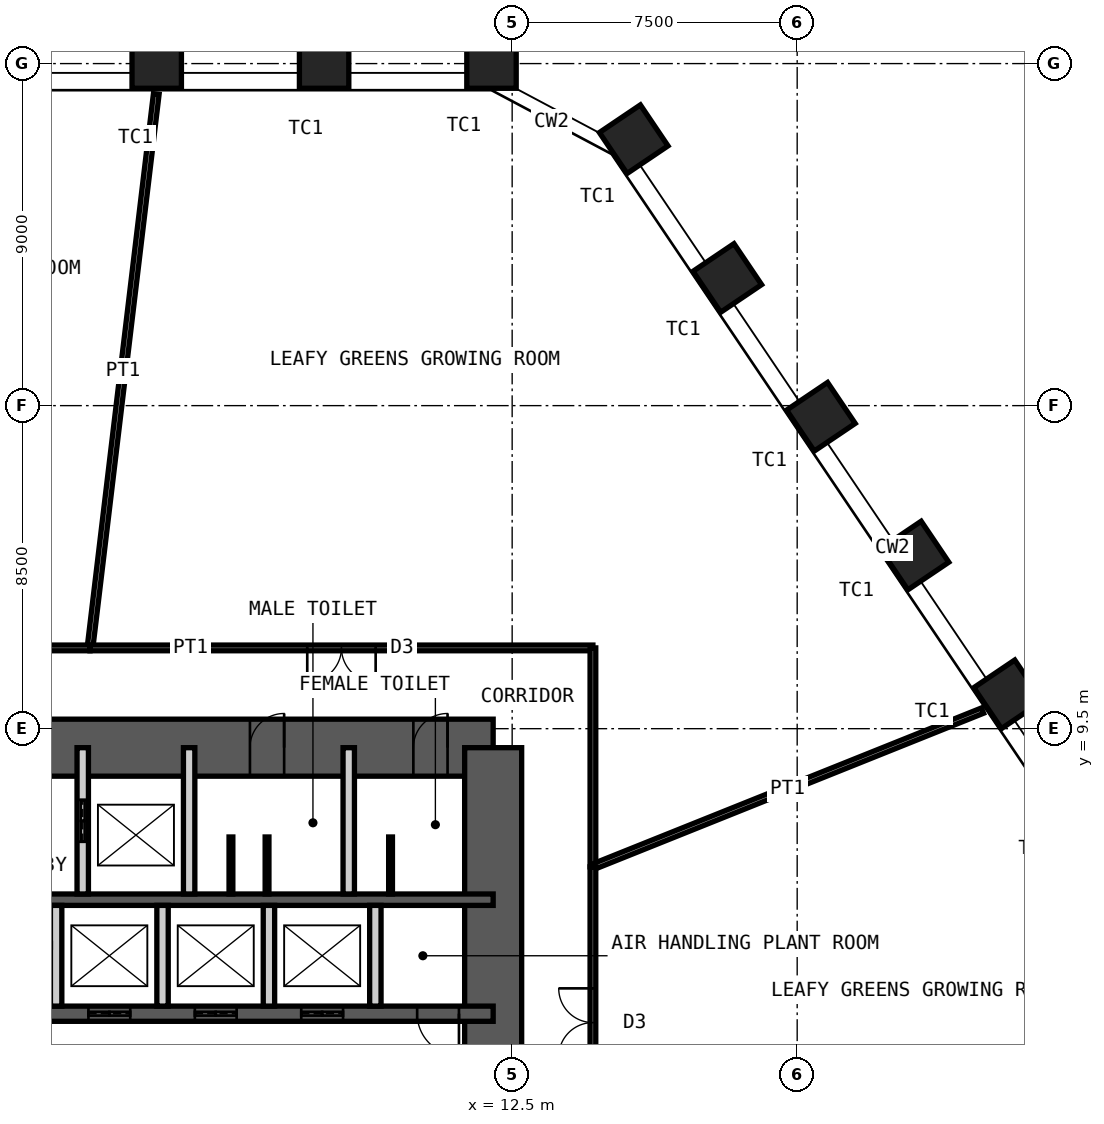
"""IFC4 building model, lengths in metres.
Left out: names, types, materials, properties, quantities, classifications, styles, units other than length and angle.
Written with IfcOpenShell. Run it as: python <this file> out.ifc"""

import sys

from ifc_helpers import new_model, si_unit, direction, frame, frame_2d, origin, origin_2d, place, context, subcontext, project, spatial, rectangle, hollow_rectangle, extrude, element, fill, save


model = new_model("IFC4")
c1 = context("Model", 3, precision=1e-05, world=origin(), true_north=direction((0.0, 1.0)))
c2 = subcontext(c1, "Body", "Model", "MODEL_VIEW")
j1 = project(units=[si_unit("LENGTHUNIT", "METRE"), si_unit("PLANEANGLEUNIT", "RADIAN")], contexts=[c1])
p1 = place(None, origin())
s1 = spatial("IfcSite", under=j1, at=p1, CompositionType="ELEMENT")
p2 = place(p1, origin())
s2 = spatial("IfcBuilding", under=s1, at=p2, CompositionType="ELEMENT")
p3 = place(p2, frame((0.0, 0.0, 47.0)))
s3 = spatial("IfcBuildingStorey", under=s2, at=p3, CompositionType="ELEMENT", Elevation=47.0)
for number, where, z_axis, x_axis in (
    (1, (3.147, 27.0, 0.0), (0.0, 0.0, 1.0), (-1.0, 0.0, 0.0)),
    (2, (7.552, 27.0, 0.0), (0.0, 0.0, 1.0), (-1.0, 0.0, 0.0)),
    (3, (11.956, 27.0, 0.0), (0.0, 0.0, 1.0), (-1.0, 0.0, 0.0)),
    (4, (15.698, 25.01, 0.0), (0.0, 0.0, 1.0), (-0.559, 0.829, 0.0)),
    (5, (18.161, 21.359, 0.0), (0.0, 0.0, 1.0), (-0.559, 0.829, 0.0)),
    (6, (20.624, 17.707, 0.0), (0.0, 0.0, 1.0), (-0.559, 0.829, 0.0)),
    (7, (23.087, 14.056, 0.0), (0.0, 0.0, 1.0), (-0.559, 0.829, 0.0)),
    (8, (25.55, 10.404, 0.0), (0.0, 0.0, 1.0), (-0.559, 0.829, 0.0)),
):
    element("IfcColumn", number, at=place(p3, frame(where, z_axis=z_axis, x_axis=x_axis)), inside=s3, PredefinedType="COLUMN", context=c2, shape_type="SweptSolid", body=[
        extrude(hollow_rectangle(XDim=1.3, YDim=1.3, WallThickness=0.1, at=origin_2d()), origin(), (0.0, 0.0, 1.0), 5.0),
    ])
p4 = place(p3, frame((-12.0, 9.0, 0.0), z_axis=(0.0, 0.0, 1.0), x_axis=(1.0, 0.0, 0.0)))
e9 = element("IfcWall", 9, at=p4, inside=s3, PredefinedType="SHEAR", context=c2, shape_type="SweptSolid", body=[
    extrude(rectangle(XDim=24.0, YDim=1.5, at=frame_2d((12.0, 0.0))), origin(), (0.0, 0.0, 1.0), 5.0),
])
p5 = place(p4, frame((10.4, 0.0, 0.0)))
e10 = element("IfcOpeningElement", 10, at=p5, cuts=e9, PredefinedType="OPENING", context=c2, shape_type="SweptSolid", body=[
    extrude(rectangle(XDim=1.0, YDim=2.1, at=frame_2d((0.5, 1.05))), frame((0.0, 0.76, 0.0), z_axis=(0.0, -1.0, 0.0), x_axis=(1.0, 0.0, 0.0)), (0.0, 0.0, 1.0), 1.52),
])
p6 = place(p4, frame((17.6, 0.0, 0.0)))
e11 = element("IfcOpeningElement", 11, at=p6, cuts=e9, PredefinedType="OPENING", context=c2, shape_type="SweptSolid", body=[
    extrude(rectangle(XDim=0.9, YDim=2.1, at=frame_2d((0.45, 1.05))), frame((0.0, 0.76, 0.0), z_axis=(0.0, -1.0, 0.0), x_axis=(1.0, 0.0, 0.0)), (0.0, 0.0, 1.0), 1.52),
])
p7 = place(p4, frame((21.9, 0.0, 0.0)))
e12 = element("IfcOpeningElement", 12, at=p7, cuts=e9, PredefinedType="OPENING", context=c2, shape_type="SweptSolid", body=[
    extrude(rectangle(XDim=0.9, YDim=2.1, at=frame_2d((0.45, 1.05))), frame((0.0, 0.76, 0.0), z_axis=(0.0, -1.0, 0.0), x_axis=(1.0, 0.0, 0.0)), (0.0, 0.0, 1.0), 1.52),
])
p8 = place(p3, frame((12.0, -9.0, 0.0), z_axis=(0.0, 0.0, 1.0), x_axis=(0.0, 1.0, 0.0)))
e13 = element("IfcWall", 13, at=p8, inside=s3, PredefinedType="SHEAR", context=c2, shape_type="SweptSolid", body=[
    extrude(rectangle(XDim=18.0, YDim=1.5, at=frame_2d((9.0, 0.0))), origin(), (0.0, 0.0, 1.0), 5.0),
])
p9 = place(p8, frame((8.1, 0.0, 0.0)))
e14 = element("IfcOpeningElement", 14, at=p9, cuts=e13, PredefinedType="OPENING", context=c2, shape_type="SweptSolid", body=[
    extrude(rectangle(XDim=1.8, YDim=2.1, at=frame_2d((0.9, 1.05))), frame((0.0, 0.76, 0.0), z_axis=(0.0, -1.0, 0.0), x_axis=(1.0, 0.0, 0.0)), (0.0, 0.0, 1.0), 1.52),
])
p10 = place(p3, frame((-12.0, 5.0, 0.0), z_axis=(0.0, 0.0, 1.0), x_axis=(1.0, 0.0, 0.0)))
e15 = element("IfcWall", 15, at=p10, inside=s3, PredefinedType="SHEAR", context=c2, shape_type="SweptSolid", body=[
    extrude(rectangle(XDim=24.0, YDim=0.3, at=frame_2d((12.0, 0.0))), origin(), (0.0, 0.0, 1.0), 5.0),
])
p11 = place(p3, frame((-12.0, 2.0, 0.0), z_axis=(0.0, 0.0, 1.0), x_axis=(1.0, 0.0, 0.0)))
e16 = element("IfcWall", 16, at=p11, inside=s3, PredefinedType="SHEAR", context=c2, shape_type="SweptSolid", body=[
    extrude(rectangle(XDim=24.0, YDim=0.4, at=frame_2d((12.0, 0.0))), origin(), (0.0, 0.0, 1.0), 5.0),
])
p12 = place(p11, frame((2.4, 0.0, 0.0)))
e17 = element("IfcOpeningElement", 17, at=p12, cuts=e16, PredefinedType="OPENING", context=c2, shape_type="SweptSolid", body=[
    extrude(rectangle(XDim=1.1, YDim=2.1, at=frame_2d((0.55, 1.05))), frame((0.0, 0.21, 0.0), z_axis=(0.0, -1.0, 0.0), x_axis=(1.0, 0.0, 0.0)), (0.0, 0.0, 1.0), 0.42),
])
p13 = place(p11, frame((22.0, 0.0, 0.0)))
e18 = element("IfcOpeningElement", 18, at=p13, cuts=e16, PredefinedType="OPENING", context=c2, shape_type="SweptSolid", body=[
    extrude(rectangle(XDim=1.1, YDim=2.1, at=frame_2d((0.55, 1.05))), frame((0.0, 0.21, 0.0), z_axis=(0.0, -1.0, 0.0), x_axis=(1.0, 0.0, 0.0)), (0.0, 0.0, 1.0), 0.42),
])
p14 = place(p11, frame((10.15, 0.0, 0.0)))
e19 = element("IfcOpeningElement", 19, at=p14, cuts=e16, PredefinedType="OPENING", context=c2, shape_type="SweptSolid", body=[
    extrude(rectangle(XDim=1.0, YDim=2.1, at=frame_2d((0.5, 1.05))), frame((0.0, 0.21, 0.0), z_axis=(0.0, -1.0, 0.0), x_axis=(1.0, 0.0, 0.0)), (0.0, 0.0, 1.0), 0.42),
])
p15 = place(p11, frame((6.7, 0.0, 0.0)))
e20 = element("IfcOpeningElement", 20, at=p15, cuts=e16, PredefinedType="OPENING", context=c2, shape_type="SweptSolid", body=[
    extrude(rectangle(XDim=1.4, YDim=2.4, at=frame_2d((0.7, 1.2))), frame((0.0, 0.21, 0.0), z_axis=(0.0, -1.0, 0.0), x_axis=(1.0, 0.0, 0.0)), (0.0, 0.0, 1.0), 0.42),
])
p16 = place(p11, frame((13.35, 0.0, 0.0)))
e21 = element("IfcOpeningElement", 21, at=p16, cuts=e16, PredefinedType="OPENING", context=c2, shape_type="SweptSolid", body=[
    extrude(rectangle(XDim=1.1, YDim=2.4, at=frame_2d((0.55, 1.2))), frame((0.0, 0.21, 0.0), z_axis=(0.0, -1.0, 0.0), x_axis=(1.0, 0.0, 0.0)), (0.0, 0.0, 1.0), 0.42),
])
p17 = place(p11, frame((16.15, 0.0, 0.0)))
e22 = element("IfcOpeningElement", 22, at=p17, cuts=e16, PredefinedType="OPENING", context=c2, shape_type="SweptSolid", body=[
    extrude(rectangle(XDim=1.1, YDim=2.4, at=frame_2d((0.55, 1.2))), frame((0.0, 0.21, 0.0), z_axis=(0.0, -1.0, 0.0), x_axis=(1.0, 0.0, 0.0)), (0.0, 0.0, 1.0), 0.42),
])
p18 = place(p11, frame((18.95, 0.0, 0.0)))
e23 = element("IfcOpeningElement", 23, at=p18, cuts=e16, PredefinedType="OPENING", context=c2, shape_type="SweptSolid", body=[
    extrude(rectangle(XDim=1.1, YDim=2.4, at=frame_2d((0.55, 1.2))), frame((0.0, 0.21, 0.0), z_axis=(0.0, -1.0, 0.0), x_axis=(1.0, 0.0, 0.0)), (0.0, 0.0, 1.0), 0.42),
])
p19 = place(p3, frame((1.2, 5.15, 0.0), z_axis=(0.0, 0.0, 1.0), x_axis=(0.0, 1.0, 0.0)))
e24 = element("IfcWall", 24, at=p19, inside=s3, PredefinedType="PARTITIONING", context=c2, shape_type="SweptSolid", body=[
    extrude(rectangle(XDim=3.85, YDim=0.3, at=frame_2d((1.925, 0.0))), origin(), (0.0, 0.0, 1.0), 4.78),
])
p20 = place(p19, frame((1.375, 0.0, 0.0)))
e25 = element("IfcOpeningElement", 25, at=p20, cuts=e24, PredefinedType="OPENING", context=c2, shape_type="SweptSolid", body=[
    extrude(rectangle(XDim=1.1, YDim=2.4, at=frame_2d((0.55, 1.2))), frame((0.0, 0.16, 0.0), z_axis=(0.0, -1.0, 0.0), x_axis=(1.0, 0.0, 0.0)), (0.0, 0.0, 1.0), 0.32),
])
for number, where, z_axis, x_axis in (
    (26, (4.0, 5.15, 0.0), (0.0, 0.0, 1.0), (0.0, 1.0, 0.0)),
    (27, (8.2, 5.15, 0.0), (0.0, 0.0, 1.0), (0.0, 1.0, 0.0)),
):
    element("IfcWall", number, at=place(p3, frame(where, z_axis=z_axis, x_axis=x_axis)), inside=s3, PredefinedType="PARTITIONING", context=c2, shape_type="SweptSolid", body=[
        extrude(rectangle(XDim=3.85, YDim=0.3, at=frame_2d((1.925, 0.0))), origin(), (0.0, 0.0, 1.0), 4.78),
    ])
for number, where, z_axis, x_axis in (
    (28, (0.5, 2.2, 0.0), (0.0, 0.0, 1.0), (0.0, 1.0, 0.0)),
    (29, (3.3, 2.2, 0.0), (0.0, 0.0, 1.0), (0.0, 1.0, 0.0)),
    (30, (6.1, 2.2, 0.0), (0.0, 0.0, 1.0), (0.0, 1.0, 0.0)),
    (31, (8.9, 2.2, 0.0), (0.0, 0.0, 1.0), (0.0, 1.0, 0.0)),
):
    element("IfcWall", number, at=place(p3, frame(where, z_axis=z_axis, x_axis=x_axis)), inside=s3, PredefinedType="PARTITIONING", context=c2, shape_type="SweptSolid", body=[
        extrude(rectangle(XDim=2.65, YDim=0.3, at=frame_2d((1.325, 0.0))), origin(), (0.0, 0.0, 1.0), 4.78),
    ])
for number, where, z_axis, x_axis in (
    (32, (5.1, 5.15, 0.0), (0.0, 0.0, 1.0), (0.0, 1.0, 0.0)),
    (33, (6.05, 5.15, 0.0), (0.0, 0.0, 1.0), (0.0, 1.0, 0.0)),
    (34, (9.3, 5.15, 0.0), (0.0, 0.0, 1.0), (0.0, 1.0, 0.0)),
):
    element("IfcWall", number, at=place(p3, frame(where, z_axis=z_axis, x_axis=x_axis)), inside=s3, PredefinedType="PARTITIONING", context=c2, shape_type="SweptSolid", body=[
        extrude(rectangle(XDim=1.5, YDim=0.1, at=frame_2d((0.75, 0.0))), origin(), (0.0, 0.0, 1.0), 2.1),
    ])
p21 = place(p3, frame((3.135, 26.201, 0.0), z_axis=(0.0, 0.0, 1.0), x_axis=(-0.118796980211, -0.992918565388, 0.0)))
e35 = element("IfcWall", 35, at=p21, inside=s3, PredefinedType="PARTITIONING", context=c2, shape_type="SweptSolid", body=[
    extrude(rectangle(XDim=14.68, YDim=0.15, at=frame_2d((7.34, 0.0))), origin(), (0.0, 0.0, 1.0), 3.7),
])
p22 = place(p3, frame((1.391, 11.625, 0.0), z_axis=(0.0, 0.0, 1.0), x_axis=(1.0, 0.0, 0.0)))
e36 = element("IfcWall", 36, at=p22, inside=s3, PredefinedType="PARTITIONING", context=c2, shape_type="SweptSolid", body=[
    extrude(rectangle(XDim=13.234, YDim=0.15, at=frame_2d((6.617, 0.0))), origin(), (0.0, 0.0, 1.0), 4.8),
])
p23 = place(p22, frame((5.717, 0.0, 0.0)))
e37 = element("IfcOpeningElement", 37, at=p23, cuts=e36, PredefinedType="OPENING", context=c2, shape_type="SweptSolid", body=[
    extrude(rectangle(XDim=1.8, YDim=2.4, at=frame_2d((0.9, 1.2))), frame((0.0, 0.085, 0.0), z_axis=(0.0, -1.0, 0.0), x_axis=(1.0, 0.0, 0.0)), (0.0, 0.0, 1.0), 0.17),
])
p24 = place(p3, frame((14.625, 11.625, 0.0), z_axis=(0.0, 0.0, 1.0), x_axis=(0.0, -1.0, 0.0)))
e38 = element("IfcWall", 38, at=p24, inside=s3, PredefinedType="PARTITIONING", context=c2, shape_type="SweptSolid", body=[
    extrude(rectangle(XDim=5.761, YDim=0.15, at=frame_2d((2.88, 0.0))), origin(), (0.0, 0.0, 1.0), 4.8),
])
p25 = place(p3, frame((24.877, 9.975, 0.0), z_axis=(0.0, 0.0, 1.0), x_axis=(-0.928157765849, -0.372186998288, 0.0)))
e39 = element("IfcWall", 39, at=p25, inside=s3, PredefinedType="PARTITIONING", context=c2, shape_type="SweptSolid", body=[
    extrude(rectangle(XDim=11.046, YDim=0.15, at=frame_2d((5.523, 0.0))), origin(), (0.0, 0.0, 1.0), 3.7),
])
p26 = place(p3, frame((14.625, 5.864, 0.0), z_axis=(0.0, 0.0, 1.0), x_axis=(0.0, -1.0, 0.0)))
e40 = element("IfcWall", 40, at=p26, inside=s3, PredefinedType="PARTITIONING", context=c2, shape_type="SweptSolid", body=[
    extrude(rectangle(XDim=8.195, YDim=0.15, at=frame_2d((4.097, 0.0))), origin(), (0.0, 0.0, 1.0), 4.8),
])
p27 = place(p26, frame((3.198, 0.0, 0.0)))
e41 = element("IfcOpeningElement", 41, at=p27, cuts=e40, PredefinedType="OPENING", context=c2, shape_type="SweptSolid", body=[
    extrude(rectangle(XDim=1.8, YDim=2.4, at=frame_2d((0.9, 1.2))), frame((0.0, 0.085, 0.0), z_axis=(0.0, -1.0, 0.0), x_axis=(1.0, 0.0, 0.0)), (0.0, 0.0, 1.0), 0.17),
])
p28 = place(p3, frame((-4.45, 11.625, 0.0), z_axis=(0.0, 0.0, 1.0), x_axis=(1.0, 0.0, 0.0)))
e42 = element("IfcWall", 42, at=p28, inside=s3, PredefinedType="PARTITIONING", context=c2, shape_type="SweptSolid", body=[
    extrude(rectangle(XDim=5.841, YDim=0.15, at=frame_2d((2.92, 0.0))), origin(), (0.0, 0.0, 1.0), 4.8),
])
p29 = place(p28, frame((2.02, 0.0, 0.0)))
e43 = element("IfcOpeningElement", 43, at=p29, cuts=e42, PredefinedType="OPENING", context=c2, shape_type="SweptSolid", body=[
    extrude(rectangle(XDim=1.8, YDim=2.4, at=frame_2d((0.9, 1.2))), frame((0.0, 0.085, 0.0), z_axis=(0.0, -1.0, 0.0), x_axis=(1.0, 0.0, 0.0)), (0.0, 0.0, 1.0), 0.17),
])
p30 = place(p6, origin())
e44 = element("IfcDoor", 44, at=p30, inside=s3, OperationType="SINGLE_SWING_LEFT", PredefinedType="DOOR", context=c2, shape_type="SweptSolid", body=[
    extrude(rectangle(XDim=0.9, YDim=2.1, at=frame_2d((0.45, 1.05))), frame((0.0, 0.025, 0.0), z_axis=(0.0, -1.0, 0.0), x_axis=(1.0, 0.0, 0.0)), (0.0, 0.0, 1.0), 0.05),
])
fill(e11, e44)
p31 = place(p7, origin())
e45 = element("IfcDoor", 45, at=p31, inside=s3, OperationType="SINGLE_SWING_LEFT", PredefinedType="DOOR", context=c2, shape_type="SweptSolid", body=[
    extrude(rectangle(XDim=0.9, YDim=2.1, at=frame_2d((0.45, 1.05))), frame((0.0, 0.025, 0.0), z_axis=(0.0, -1.0, 0.0), x_axis=(1.0, 0.0, 0.0)), (0.0, 0.0, 1.0), 0.05),
])
fill(e12, e45)
p32 = place(p13, origin())
e46 = element("IfcDoor", 46, at=p32, inside=s3, OperationType="SINGLE_SWING_RIGHT", PredefinedType="DOOR", context=c2, shape_type="SweptSolid", body=[
    extrude(rectangle(XDim=1.1, YDim=2.1, at=frame_2d((0.55, 1.05))), frame((0.0, 0.025, 0.0), z_axis=(0.0, -1.0, 0.0), x_axis=(1.0, 0.0, 0.0)), (0.0, 0.0, 1.0), 0.05),
])
fill(e18, e46)
p33 = place(p20, origin())
e47 = element("IfcDoor", 47, at=p33, inside=s3, OperationType="DOUBLE_DOOR_SLIDING", PredefinedType="DOOR", context=c2, shape_type="SweptSolid", body=[
    extrude(rectangle(XDim=1.1, YDim=2.4, at=frame_2d((0.55, 1.2))), frame((0.0, 0.025, 0.0), z_axis=(0.0, -1.0, 0.0), x_axis=(1.0, 0.0, 0.0)), (0.0, 0.0, 1.0), 0.05),
])
fill(e25, e47)
p34 = place(p16, origin())
e48 = element("IfcDoor", 48, at=p34, inside=s3, OperationType="DOUBLE_DOOR_SLIDING", PredefinedType="DOOR", context=c2, shape_type="SweptSolid", body=[
    extrude(rectangle(XDim=1.1, YDim=2.4, at=frame_2d((0.55, 1.2))), frame((0.0, 0.025, 0.0), z_axis=(0.0, -1.0, 0.0), x_axis=(1.0, 0.0, 0.0)), (0.0, 0.0, 1.0), 0.05),
])
fill(e21, e48)
p35 = place(p17, origin())
e49 = element("IfcDoor", 49, at=p35, inside=s3, OperationType="DOUBLE_DOOR_SLIDING", PredefinedType="DOOR", context=c2, shape_type="SweptSolid", body=[
    extrude(rectangle(XDim=1.1, YDim=2.4, at=frame_2d((0.55, 1.2))), frame((0.0, 0.025, 0.0), z_axis=(0.0, -1.0, 0.0), x_axis=(1.0, 0.0, 0.0)), (0.0, 0.0, 1.0), 0.05),
])
fill(e22, e49)
p36 = place(p18, origin())
e50 = element("IfcDoor", 50, at=p36, inside=s3, OperationType="DOUBLE_DOOR_SLIDING", PredefinedType="DOOR", context=c2, shape_type="SweptSolid", body=[
    extrude(rectangle(XDim=1.1, YDim=2.4, at=frame_2d((0.55, 1.2))), frame((0.0, 0.025, 0.0), z_axis=(0.0, -1.0, 0.0), x_axis=(1.0, 0.0, 0.0)), (0.0, 0.0, 1.0), 0.05),
])
fill(e23, e50)
p37 = place(p23, origin())
e51 = element("IfcDoor", 51, at=p37, inside=s3, OperationType="DOUBLE_DOOR_DOUBLE_SWING", PredefinedType="DOOR", context=c2, shape_type="SweptSolid", body=[
    extrude(rectangle(XDim=1.8, YDim=2.4, at=frame_2d((0.9, 1.2))), frame((0.0, 0.025, 0.0), z_axis=(0.0, -1.0, 0.0), x_axis=(1.0, 0.0, 0.0)), (0.0, 0.0, 1.0), 0.05),
])
fill(e37, e51)
p38 = place(p27, origin())
e52 = element("IfcDoor", 52, at=p38, inside=s3, OperationType="DOUBLE_DOOR_DOUBLE_SWING", PredefinedType="DOOR", context=c2, shape_type="SweptSolid", body=[
    extrude(rectangle(XDim=1.8, YDim=2.4, at=frame_2d((0.9, 1.2))), frame((0.0, 0.025, 0.0), z_axis=(0.0, -1.0, 0.0), x_axis=(1.0, 0.0, 0.0)), (0.0, 0.0, 1.0), 0.05),
])
fill(e41, e52)
save(model, sys.argv[1])
